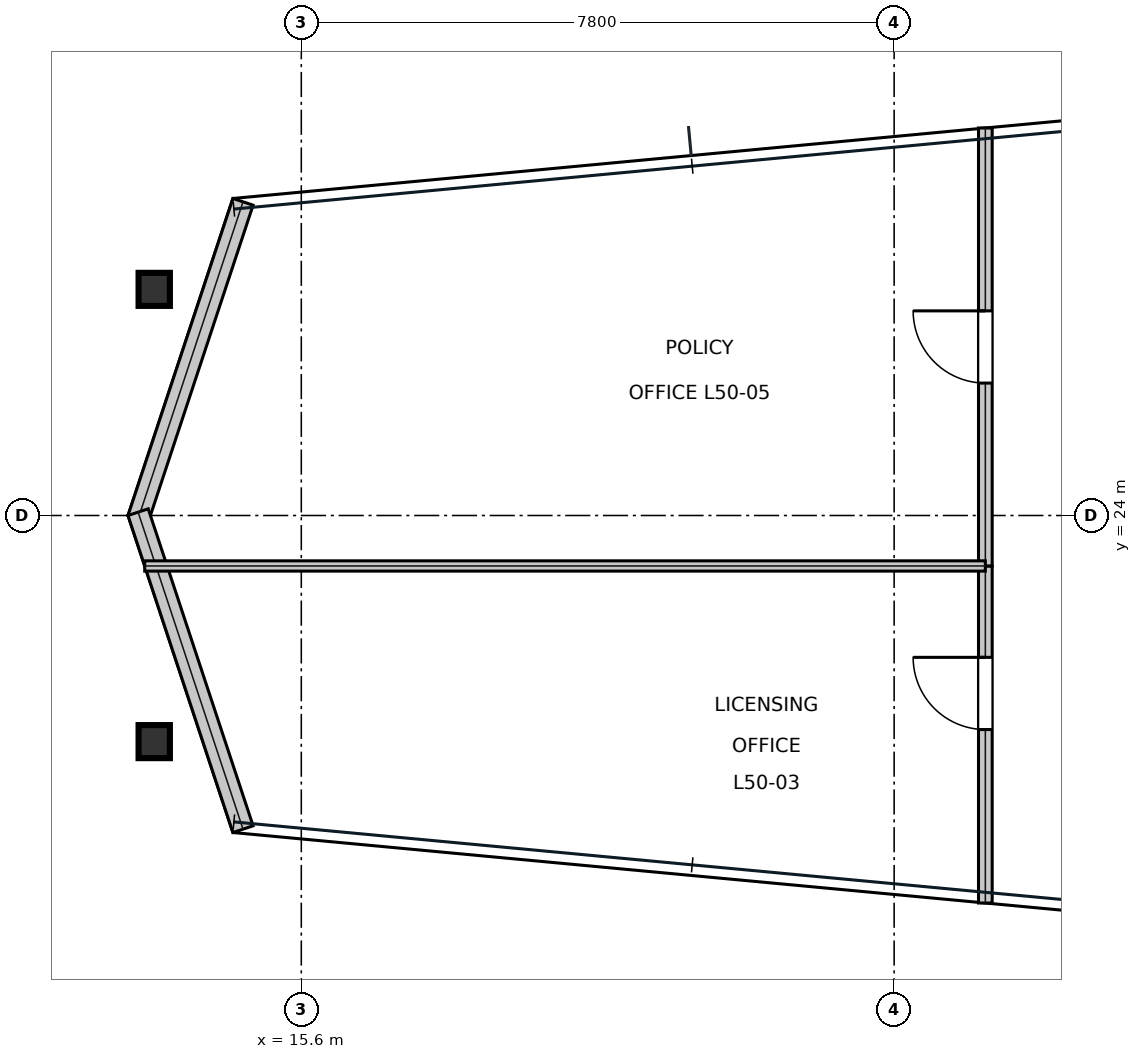
"""IFC4 building model, lengths in metres.
Left out: names, types, materials, properties, quantities, classifications, styles, units other than length and angle.
Written with IfcOpenShell. Run it as: python <this file> out.ifc"""

import sys

from ifc_helpers import new_model, si_unit, direction, frame, frame_2d, origin, origin_2d, place, context, subcontext, project, spatial, rectangle, i_section, extrude, element, fill, save


model = new_model("IFC4")
c1 = context("Model", 3, precision=1e-05, world=origin(), true_north=direction((0.0, 1.0)))
c2 = subcontext(c1, "Body", "Model", "MODEL_VIEW")
j1 = project(units=[si_unit("LENGTHUNIT", "METRE"), si_unit("PLANEANGLEUNIT", "RADIAN")], contexts=[c1])
p1 = place(None, origin())
s1 = spatial("IfcSite", under=j1, at=p1, CompositionType="ELEMENT")
p2 = place(p1, origin())
s2 = spatial("IfcBuilding", under=s1, at=p2, CompositionType="ELEMENT")
p3 = place(p2, frame((0.0, 0.0, 216.15)))
s3 = spatial("IfcBuildingStorey", under=s2, at=p3, CompositionType="ELEMENT", Elevation=216.15)
for number, where, z_axis, x_axis in (
    (1, (13.665, 21.025, 0.016), (0.0, 0.0, 1.0), (1.0, 0.0, 0.0)),
    (2, (13.665, 26.975, 0.016), (0.0, 0.0, 1.0), (1.0, 0.0, 0.0)),
):
    element("IfcColumn", number, at=place(p3, frame(where, z_axis=z_axis, x_axis=x_axis)), inside=s3, PredefinedType="COLUMN", context=c2, shape_type="SweptSolid", body=[
        extrude(i_section(OverallWidth=0.412, OverallDepth=0.435, WebThickness=0.036, FlangeThickness=0.058, at=origin_2d()), origin(), (0.0, 0.0, 1.0), 4.018),
    ])
for number, where, z_axis, x_axis in (
    (3, (14.833, 28.127, 0.0), (0.0, 0.0, 1.0), (-0.314, -0.949, 0.0)),
    (4, (13.453, 24.044, 0.0), (0.0, 0.0, 1.0), (0.314, -0.949, 0.0)),
):
    element("IfcWall", number, at=place(p3, frame(where, z_axis=z_axis, x_axis=x_axis)), inside=s3, PredefinedType="STANDARD", context=c2, shape_type="SweptSolid", body=[
        extrude(rectangle(XDim=4.393, YDim=0.28, at=frame_2d((2.197, 0.0))), origin(), (0.0, 0.0, 1.0), 3.241),
    ])
p4 = place(p3, frame((24.6, 18.902, 0.0), z_axis=(0.0, 0.0, 1.0), x_axis=(0.0, 1.0, 0.0)))
e5 = element("IfcWall", 5, at=p4, inside=s3, PredefinedType="SOLIDWALL", context=c2, shape_type="SweptSolid", body=[
    extrude(rectangle(XDim=4.434, YDim=0.18, at=frame_2d((2.217, 0.0))), origin(), (0.0, 0.0, 1.0), 3.241),
])
p5 = place(p4, frame((2.282, 0.0, 0.0)))
e6 = element("IfcOpeningElement", 6, at=p5, cuts=e5, PredefinedType="OPENING", context=c2, shape_type="SweptSolid", body=[
    extrude(rectangle(XDim=0.95, YDim=2.15, at=frame_2d((0.475, 1.075))), frame((0.0, 0.1, 0.0), z_axis=(0.0, -1.0, 0.0), x_axis=(1.0, 0.0, 0.0)), (0.0, 0.0, 1.0), 0.2),
])
p6 = place(p3, frame((24.6, 23.336, 0.0), z_axis=(0.0, 0.0, 1.0), x_axis=(0.0, 1.0, 0.0)))
e7 = element("IfcWall", 7, at=p6, inside=s3, PredefinedType="SOLIDWALL", context=c2, shape_type="SweptSolid", body=[
    extrude(rectangle(XDim=5.762, YDim=0.18, at=frame_2d((2.881, 0.0))), origin(), (0.0, 0.0, 1.0), 3.241),
])
p7 = place(p6, frame((2.406, 0.0, 0.0)))
e8 = element("IfcOpeningElement", 8, at=p7, cuts=e7, PredefinedType="OPENING", context=c2, shape_type="SweptSolid", body=[
    extrude(rectangle(XDim=0.95, YDim=2.15, at=frame_2d((0.475, 1.075))), frame((0.0, 0.1, 0.0), z_axis=(0.0, -1.0, 0.0), x_axis=(1.0, 0.0, 0.0)), (0.0, 0.0, 1.0), 0.2),
])
p8 = place(p3, frame((13.54, 23.336, 0.0), z_axis=(0.0, 0.0, 1.0), x_axis=(1.0, 0.0, 0.0)))
e9 = element("IfcWall", 9, at=p8, inside=s3, PredefinedType="PARTITIONING", context=c2, shape_type="SweptSolid", body=[
    extrude(rectangle(XDim=11.06, YDim=0.135, at=frame_2d((5.53, 0.0))), origin(), (0.0, 0.0, 1.0), 3.319),
])
p9 = place(p5, origin())
e10 = element("IfcDoor", 10, at=p9, inside=s3, OperationType="SINGLE_SWING_RIGHT", PredefinedType="DOOR", context=c2, shape_type="SweptSolid", body=[
    extrude(rectangle(XDim=0.95, YDim=2.15, at=frame_2d((0.475, 1.075))), frame((0.0, 0.025, 0.0), z_axis=(0.0, -1.0, 0.0), x_axis=(1.0, 0.0, 0.0)), (0.0, 0.0, 1.0), 0.05),
])
fill(e6, e10)
p10 = place(p7, origin())
e11 = element("IfcDoor", 11, at=p10, inside=s3, OperationType="SINGLE_SWING_RIGHT", PredefinedType="DOOR", context=c2, shape_type="SweptSolid", body=[
    extrude(rectangle(XDim=0.95, YDim=2.15, at=frame_2d((0.475, 1.075))), frame((0.0, 0.025, 0.0), z_axis=(0.0, -1.0, 0.0), x_axis=(1.0, 0.0, 0.0)), (0.0, 0.0, 1.0), 0.05),
])
fill(e8, e11)
save(model, sys.argv[1])
